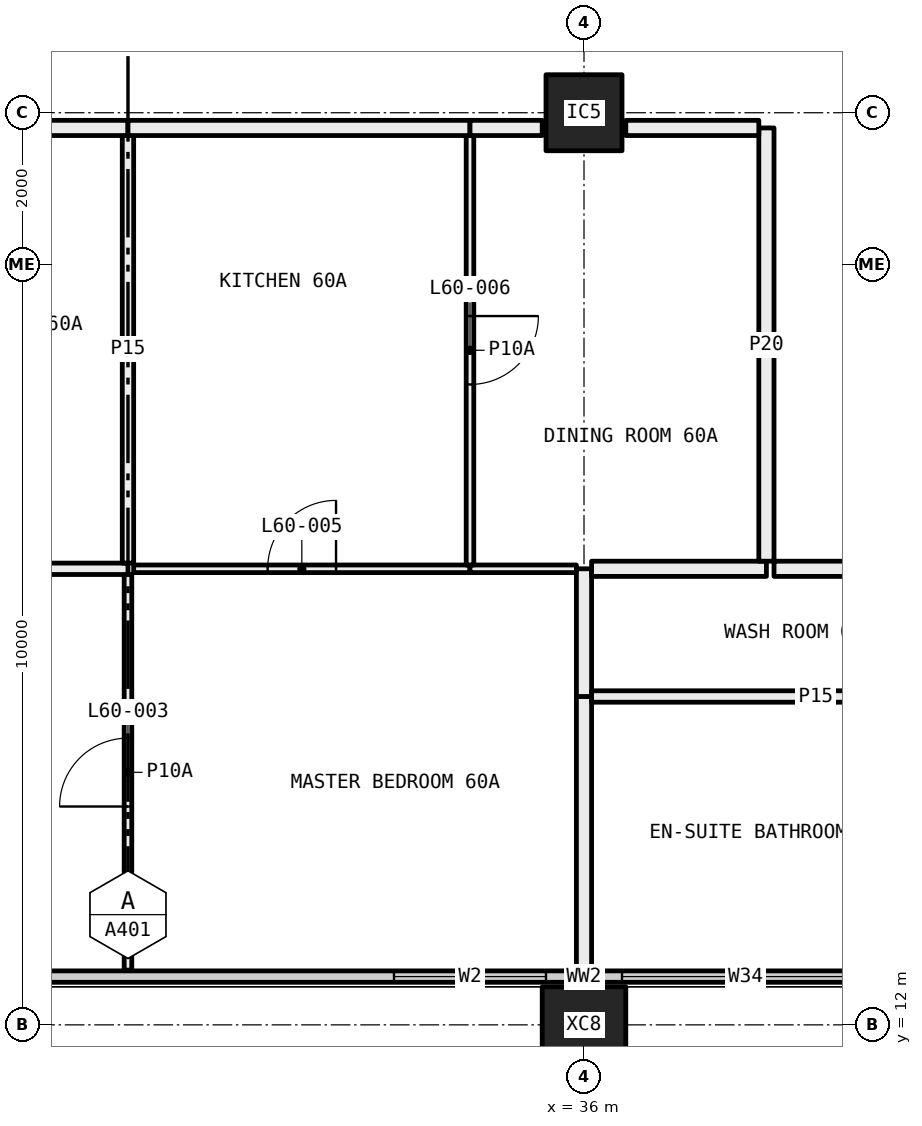
"""IFC4 building model, lengths in metres.
Left out: names, types, materials, properties, quantities, classifications, styles, units other than length and angle.
Written with IfcOpenShell. Run it as: python <this file> out.ifc"""

import sys

from ifc_helpers import new_model, si_unit, direction, frame, frame_2d, origin, origin_2d, place, context, subcontext, project, spatial, rectangle, hollow_rectangle, extrude, element, fill, save


model = new_model("IFC4")
c1 = context("Model", 3, precision=1e-05, world=origin(), true_north=direction((0.0, 1.0)))
c2 = subcontext(c1, "Body", "Model", "MODEL_VIEW")
j1 = project(units=[si_unit("LENGTHUNIT", "METRE"), si_unit("PLANEANGLEUNIT", "RADIAN")], contexts=[c1])
p1 = place(None, origin())
s1 = spatial("IfcSite", under=j1, at=p1, CompositionType="ELEMENT")
p2 = place(p1, origin())
s2 = spatial("IfcBuilding", under=s1, at=p2, CompositionType="ELEMENT")
p3 = place(p2, frame((0.0, 0.0, 224.85)))
s3 = spatial("IfcBuildingStorey", under=s2, at=p3, CompositionType="ELEMENT", Elevation=224.85)
p4 = place(p3, frame((36.0, 12.0, -0.4), z_axis=(0.0, 0.0, 1.0), x_axis=(1.0, 0.0, 0.0)))
e1 = element("IfcColumn", 1, at=p4, inside=s3, PredefinedType="COLUMN", context=c2, shape_type="SweptSolid", body=[
    extrude(hollow_rectangle(XDim=1.1, YDim=1.0, WallThickness=0.04, at=origin_2d()), origin(), (0.0, 0.0, 1.0), 3.45),
])
p5 = place(p3, frame((36.0, 24.0, 0.0), z_axis=(0.0, 0.0, 1.0), x_axis=(1.0, 0.0, 0.0)))
e2 = element("IfcColumn", 2, at=p5, inside=s3, PredefinedType="COLUMN", context=c2, shape_type="SweptSolid", body=[
    extrude(hollow_rectangle(XDim=1.0, YDim=1.0, WallThickness=0.04, at=origin_2d()), origin(), (0.0, 0.0, 1.0), 3.05),
])
p6 = place(p3, frame((18.56, 12.635, 0.0), z_axis=(0.0, 0.0, 1.0), x_axis=(1.0, 0.0, 0.0)))
e3 = element("IfcWall", 3, at=p6, inside=s3, PredefinedType="ELEMENTEDWALL", context=c2, shape_type="SweptSolid", body=[
    extrude(rectangle(XDim=34.88, YDim=0.15, at=frame_2d((17.44, 0.0))), origin(), (0.0, 0.0, 1.0), 3.05),
])
p7 = place(p6, frame((0.44, 0.0, 0.45)))
e4 = element("IfcOpeningElement", 4, at=p7, cuts=e3, PredefinedType="OPENING", context=c2, shape_type="SweptSolid", body=[
    extrude(rectangle(XDim=4.5, YDim=2.55, at=frame_2d((2.25, 1.275))), frame((0.0, 0.085, 0.0), z_axis=(0.0, -1.0, 0.0), x_axis=(1.0, 0.0, 0.0)), (0.0, 0.0, 1.0), 0.17),
])
p8 = place(p6, frame((5.94, 0.0, 0.45)))
e5 = element("IfcOpeningElement", 5, at=p8, cuts=e3, PredefinedType="OPENING", context=c2, shape_type="SweptSolid", body=[
    extrude(rectangle(XDim=3.25, YDim=2.55, at=frame_2d((1.625, 1.275))), frame((0.0, 0.085, 0.0), z_axis=(0.0, -1.0, 0.0), x_axis=(1.0, 0.0, 0.0)), (0.0, 0.0, 1.0), 0.17),
])
p9 = place(p6, frame((14.94, 0.0, 0.45)))
e6 = element("IfcOpeningElement", 6, at=p9, cuts=e3, PredefinedType="OPENING", context=c2, shape_type="SweptSolid", body=[
    extrude(rectangle(XDim=2.0, YDim=2.55, at=frame_2d((1.0, 1.275))), frame((0.0, 0.085, 0.0), z_axis=(0.0, -1.0, 0.0), x_axis=(1.0, 0.0, 0.0)), (0.0, 0.0, 1.0), 0.17),
])
p10 = place(p6, frame((17.94, 0.0, 0.45)))
e7 = element("IfcOpeningElement", 7, at=p10, cuts=e3, PredefinedType="OPENING", context=c2, shape_type="SweptSolid", body=[
    extrude(rectangle(XDim=3.25, YDim=2.55, at=frame_2d((1.625, 1.275))), frame((0.0, 0.085, 0.0), z_axis=(0.0, -1.0, 0.0), x_axis=(1.0, 0.0, 0.0)), (0.0, 0.0, 1.0), 0.17),
])
p11 = place(p6, frame((25.69, 0.0, 0.45)))
e8 = element("IfcOpeningElement", 8, at=p11, cuts=e3, PredefinedType="OPENING", context=c2, shape_type="SweptSolid", body=[
    extrude(rectangle(XDim=3.25, YDim=2.55, at=frame_2d((1.625, 1.275))), frame((0.0, 0.085, 0.0), z_axis=(0.0, -1.0, 0.0), x_axis=(1.0, 0.0, 0.0)), (0.0, 0.0, 1.0), 0.17),
])
p12 = place(p6, frame((29.94, 0.0, 0.45)))
e9 = element("IfcOpeningElement", 9, at=p12, cuts=e3, PredefinedType="OPENING", context=c2, shape_type="SweptSolid", body=[
    extrude(rectangle(XDim=4.5, YDim=2.55, at=frame_2d((2.25, 1.275))), frame((0.0, 0.085, 0.0), z_axis=(0.0, -1.0, 0.0), x_axis=(1.0, 0.0, 0.0)), (0.0, 0.0, 1.0), 0.17),
])
p13 = place(p3, frame((30.0, 12.72, 0.0), z_axis=(0.0, 0.0, 1.0), x_axis=(0.0, 1.0, 0.0)))
e10 = element("IfcWall", 10, at=p13, inside=s3, PredefinedType="PARTITIONING", context=c2, shape_type="SweptSolid", body=[
    extrude(rectangle(XDim=5.205, YDim=0.1, at=frame_2d((2.603, 0.0))), origin(), (0.0, 0.0, 1.0), 3.05),
])
p14 = place(p13, frame((2.153, 0.0, 0.0)))
e11 = element("IfcOpeningElement", 11, at=p14, cuts=e10, PredefinedType="OPENING", context=c2, shape_type="SweptSolid", body=[
    extrude(rectangle(XDim=0.9, YDim=2.1, at=frame_2d((0.45, 1.05))), frame((0.0, 0.06, 0.0), z_axis=(0.0, -1.0, 0.0), x_axis=(1.0, 0.0, 0.0)), (0.0, 0.0, 1.0), 0.12),
])
p15 = place(p3, frame((30.0, 18.0, 0.0), z_axis=(0.0, 0.0, 1.0), x_axis=(-1.0, 0.0, 0.0)))
e12 = element("IfcWall", 12, at=p15, inside=s3, PredefinedType="PARTITIONING", context=c2, shape_type="SweptSolid", body=[
    extrude(rectangle(XDim=4.0, YDim=0.15, at=frame_2d((2.0, 0.0))), origin(), (0.0, 0.0, 1.0), 3.05),
])
p16 = place(p15, frame((1.55, 0.0, 0.0)))
e13 = element("IfcOpeningElement", 13, at=p16, cuts=e12, PredefinedType="OPENING", context=c2, shape_type="SweptSolid", body=[
    extrude(rectangle(XDim=0.9, YDim=2.1, at=frame_2d((0.45, 1.05))), frame((0.0, 0.085, 0.0), z_axis=(0.0, -1.0, 0.0), x_axis=(1.0, 0.0, 0.0)), (0.0, 0.0, 1.0), 0.17),
])
p17 = place(p3, frame((34.5, 18.0, 0.0), z_axis=(0.0, 0.0, 1.0), x_axis=(-1.0, 0.0, 0.0)))
e14 = element("IfcWall", 14, at=p17, inside=s3, PredefinedType="PARTITIONING", context=c2, shape_type="SweptSolid", body=[
    extrude(rectangle(XDim=4.425, YDim=0.1, at=frame_2d((2.212, 0.0))), origin(), (0.0, 0.0, 1.0), 3.05),
])
p18 = place(p17, frame((1.762, 0.0, 0.0)))
e15 = element("IfcOpeningElement", 15, at=p18, cuts=e14, PredefinedType="OPENING", context=c2, shape_type="SweptSolid", body=[
    extrude(rectangle(XDim=0.9, YDim=2.1, at=frame_2d((0.45, 1.05))), frame((0.0, 0.06, 0.0), z_axis=(0.0, -1.0, 0.0), x_axis=(1.0, 0.0, 0.0)), (0.0, 0.0, 1.0), 0.12),
])
p19 = place(p3, frame((35.9, 18.0, 0.0), z_axis=(0.0, 0.0, 1.0), x_axis=(-1.0, 0.0, 0.0)))
e16 = element("IfcWall", 16, at=p19, inside=s3, PredefinedType="PARTITIONING", context=c2, shape_type="SweptSolid", body=[
    extrude(rectangle(XDim=1.4, YDim=0.1, at=frame_2d((0.7, 0.0))), origin(), (0.0, 0.0, 1.0), 3.05),
])
p20 = place(p3, frame((36.0, 12.72, 0.0), z_axis=(0.0, 0.0, 1.0), x_axis=(0.0, 1.0, 0.0)))
e17 = element("IfcWall", 17, at=p20, inside=s3, PredefinedType="PARTITIONING", context=c2, shape_type="SweptSolid", body=[
    extrude(rectangle(XDim=3.6, YDim=0.2, at=frame_2d((1.8, 0.0))), origin(), (0.0, 0.0, 1.0), 2.45),
])
p21 = place(p3, frame((36.0, 16.32, 0.0), z_axis=(0.0, 0.0, 1.0), x_axis=(0.0, 1.0, 0.0)))
e18 = element("IfcWall", 18, at=p21, inside=s3, PredefinedType="PARTITIONING", context=c2, shape_type="SweptSolid", body=[
    extrude(rectangle(XDim=1.68, YDim=0.2, at=frame_2d((0.84, 0.0))), origin(), (0.0, 0.0, 1.0), 2.45),
])
p22 = place(p3, frame((30.0, 18.075, 0.0), z_axis=(0.0, 0.0, 1.0), x_axis=(0.0, 1.0, 0.0)))
e19 = element("IfcWall", 19, at=p22, inside=s3, PredefinedType="PARTITIONING", context=c2, shape_type="SweptSolid", body=[
    extrude(rectangle(XDim=5.625, YDim=0.15, at=frame_2d((2.812, 0.0))), origin(), (0.0, 0.0, 1.0), 3.05),
])
p23 = place(p3, frame((30.0, 23.8, 0.0), z_axis=(0.0, 0.0, 1.0), x_axis=(-1.0, 0.0, 0.0)))
e20 = element("IfcWall", 20, at=p23, inside=s3, PredefinedType="PARTITIONING", context=c2, shape_type="SweptSolid", body=[
    extrude(rectangle(XDim=4.1, YDim=0.2, at=frame_2d((2.05, 0.0))), origin(), (0.0, 0.0, 1.0), 3.05),
])
p24 = place(p3, frame((34.5, 18.05, 0.0), z_axis=(0.0, 0.0, 1.0), x_axis=(0.0, 1.0, 0.0)))
e21 = element("IfcWall", 21, at=p24, inside=s3, PredefinedType="PARTITIONING", context=c2, shape_type="SweptSolid", body=[
    extrude(rectangle(XDim=5.65, YDim=0.1, at=frame_2d((2.825, 0.0))), origin(), (0.0, 0.0, 1.0), 3.05),
])
p25 = place(p24, frame((2.375, 0.0, 0.0)))
e22 = element("IfcOpeningElement", 22, at=p25, cuts=e21, PredefinedType="OPENING", context=c2, shape_type="SweptSolid", body=[
    extrude(rectangle(XDim=0.9, YDim=2.1, at=frame_2d((0.45, 1.05))), frame((0.0, 0.06, 0.0), z_axis=(0.0, -1.0, 0.0), x_axis=(1.0, 0.0, 0.0)), (0.0, 0.0, 1.0), 0.12),
])
p26 = place(p3, frame((34.5, 23.8, 0.0), z_axis=(0.0, 0.0, 1.0), x_axis=(-1.0, 0.0, 0.0)))
e23 = element("IfcWall", 23, at=p26, inside=s3, PredefinedType="PARTITIONING", context=c2, shape_type="SweptSolid", body=[
    extrude(rectangle(XDim=4.5, YDim=0.2, at=frame_2d((2.25, 0.0))), origin(), (0.0, 0.0, 1.0), 3.05),
])
p27 = place(p3, frame((36.1, 18.0, 0.0), z_axis=(0.0, 0.0, 1.0), x_axis=(1.0, 0.0, 0.0)))
e24 = element("IfcWall", 24, at=p27, inside=s3, PredefinedType="PARTITIONING", context=c2, shape_type="SweptSolid", body=[
    extrude(rectangle(XDim=2.3, YDim=0.2, at=frame_2d((1.15, 0.0))), origin(), (0.0, 0.0, 1.0), 3.05),
])
p28 = place(p3, frame((35.45, 23.8, 0.0), z_axis=(0.0, 0.0, 1.0), x_axis=(-1.0, 0.0, 0.0)))
e25 = element("IfcWall", 25, at=p28, inside=s3, PredefinedType="PARTITIONING", context=c2, shape_type="SweptSolid", body=[
    extrude(rectangle(XDim=0.95, YDim=0.2, at=frame_2d((0.475, 0.0))), origin(), (0.0, 0.0, 1.0), 3.05),
])
p29 = place(p3, frame((38.4, 18.1, 0.0), z_axis=(0.0, 0.0, 1.0), x_axis=(0.0, 1.0, 0.0)))
e26 = element("IfcWall", 26, at=p29, inside=s3, PredefinedType="PARTITIONING", context=c2, shape_type="SweptSolid", body=[
    extrude(rectangle(XDim=5.7, YDim=0.2, at=frame_2d((2.85, 0.0))), origin(), (0.0, 0.0, 1.0), 3.05),
])
p30 = place(p3, frame((38.3, 23.8, 0.0), z_axis=(0.0, 0.0, 1.0), x_axis=(-1.0, 0.0, 0.0)))
e27 = element("IfcWall", 27, at=p30, inside=s3, PredefinedType="PARTITIONING", context=c2, shape_type="SweptSolid", body=[
    extrude(rectangle(XDim=1.75, YDim=0.2, at=frame_2d((0.875, 0.0))), origin(), (0.0, 0.0, 1.0), 3.05),
])
p31 = place(p3, frame((42.0, 16.32, 0.0), z_axis=(0.0, 0.0, 1.0), x_axis=(-1.0, 0.0, 0.0)))
e28 = element("IfcWall", 28, at=p31, inside=s3, PredefinedType="PARTITIONING", context=c2, shape_type="SweptSolid", body=[
    extrude(rectangle(XDim=5.9, YDim=0.15, at=frame_2d((2.95, 0.0))), origin(), (0.0, 0.0, 1.0), 3.05),
])
p32 = place(p3, frame((40.8, 18.0, 0.0), z_axis=(0.0, 0.0, 1.0), x_axis=(-1.0, 0.0, 0.0)))
e29 = element("IfcWall", 29, at=p32, inside=s3, PredefinedType="PARTITIONING", context=c2, shape_type="SweptSolid", body=[
    extrude(rectangle(XDim=2.3, YDim=0.2, at=frame_2d((1.15, 0.0))), origin(), (0.0, 0.0, 1.0), 3.05),
])
p33 = place(p9, origin())
e30 = element("IfcWindow", 30, at=p33, inside=s3, PartitioningType="SINGLE_PANEL", PredefinedType="WINDOW", context=c2, shape_type="SweptSolid", body=[
    extrude(rectangle(XDim=2.0, YDim=2.55, at=frame_2d((1.0, 1.275))), frame((0.0, 0.03, 0.0), z_axis=(0.0, -1.0, 0.0), x_axis=(1.0, 0.0, 0.0)), (0.0, 0.0, 1.0), 0.06),
])
fill(e6, e30)
p34 = place(p10, origin())
e31 = element("IfcWindow", 31, at=p34, inside=s3, PartitioningType="SINGLE_PANEL", PredefinedType="WINDOW", context=c2, shape_type="SweptSolid", body=[
    extrude(rectangle(XDim=3.25, YDim=2.55, at=frame_2d((1.625, 1.275))), frame((0.0, 0.03, 0.0), z_axis=(0.0, -1.0, 0.0), x_axis=(1.0, 0.0, 0.0)), (0.0, 0.0, 1.0), 0.06),
])
fill(e7, e31)
p35 = place(p14, origin())
e32 = element("IfcDoor", 32, at=p35, inside=s3, OperationType="SINGLE_SWING_RIGHT", PredefinedType="DOOR", context=c2, shape_type="SweptSolid", body=[
    extrude(rectangle(XDim=0.9, YDim=2.1, at=frame_2d((0.45, 1.05))), frame((0.0, 0.025, 0.0), z_axis=(0.0, -1.0, 0.0), x_axis=(1.0, 0.0, 0.0)), (0.0, 0.0, 1.0), 0.05),
])
fill(e11, e32)
p36 = place(p18, frame((0.9, 0.0, 0.0), x_axis=(-1.0, 0.0, 0.0)))
e33 = element("IfcDoor", 33, at=p36, inside=s3, OperationType="SINGLE_SWING_LEFT", PredefinedType="DOOR", context=c2, shape_type="SweptSolid", body=[
    extrude(rectangle(XDim=0.9, YDim=2.1, at=frame_2d((0.45, 1.05))), frame((0.0, 0.025, 0.0), z_axis=(0.0, -1.0, 0.0), x_axis=(1.0, 0.0, 0.0)), (0.0, 0.0, 1.0), 0.05),
])
fill(e15, e33)
p37 = place(p25, frame((0.9, 0.0, 0.0), x_axis=(-1.0, 0.0, 0.0)))
e34 = element("IfcDoor", 34, at=p37, inside=s3, OperationType="SINGLE_SWING_RIGHT", PredefinedType="DOOR", context=c2, shape_type="SweptSolid", body=[
    extrude(rectangle(XDim=0.9, YDim=2.1, at=frame_2d((0.45, 1.05))), frame((0.0, 0.025, 0.0), z_axis=(0.0, -1.0, 0.0), x_axis=(1.0, 0.0, 0.0)), (0.0, 0.0, 1.0), 0.05),
])
fill(e22, e34)
save(model, sys.argv[1])
